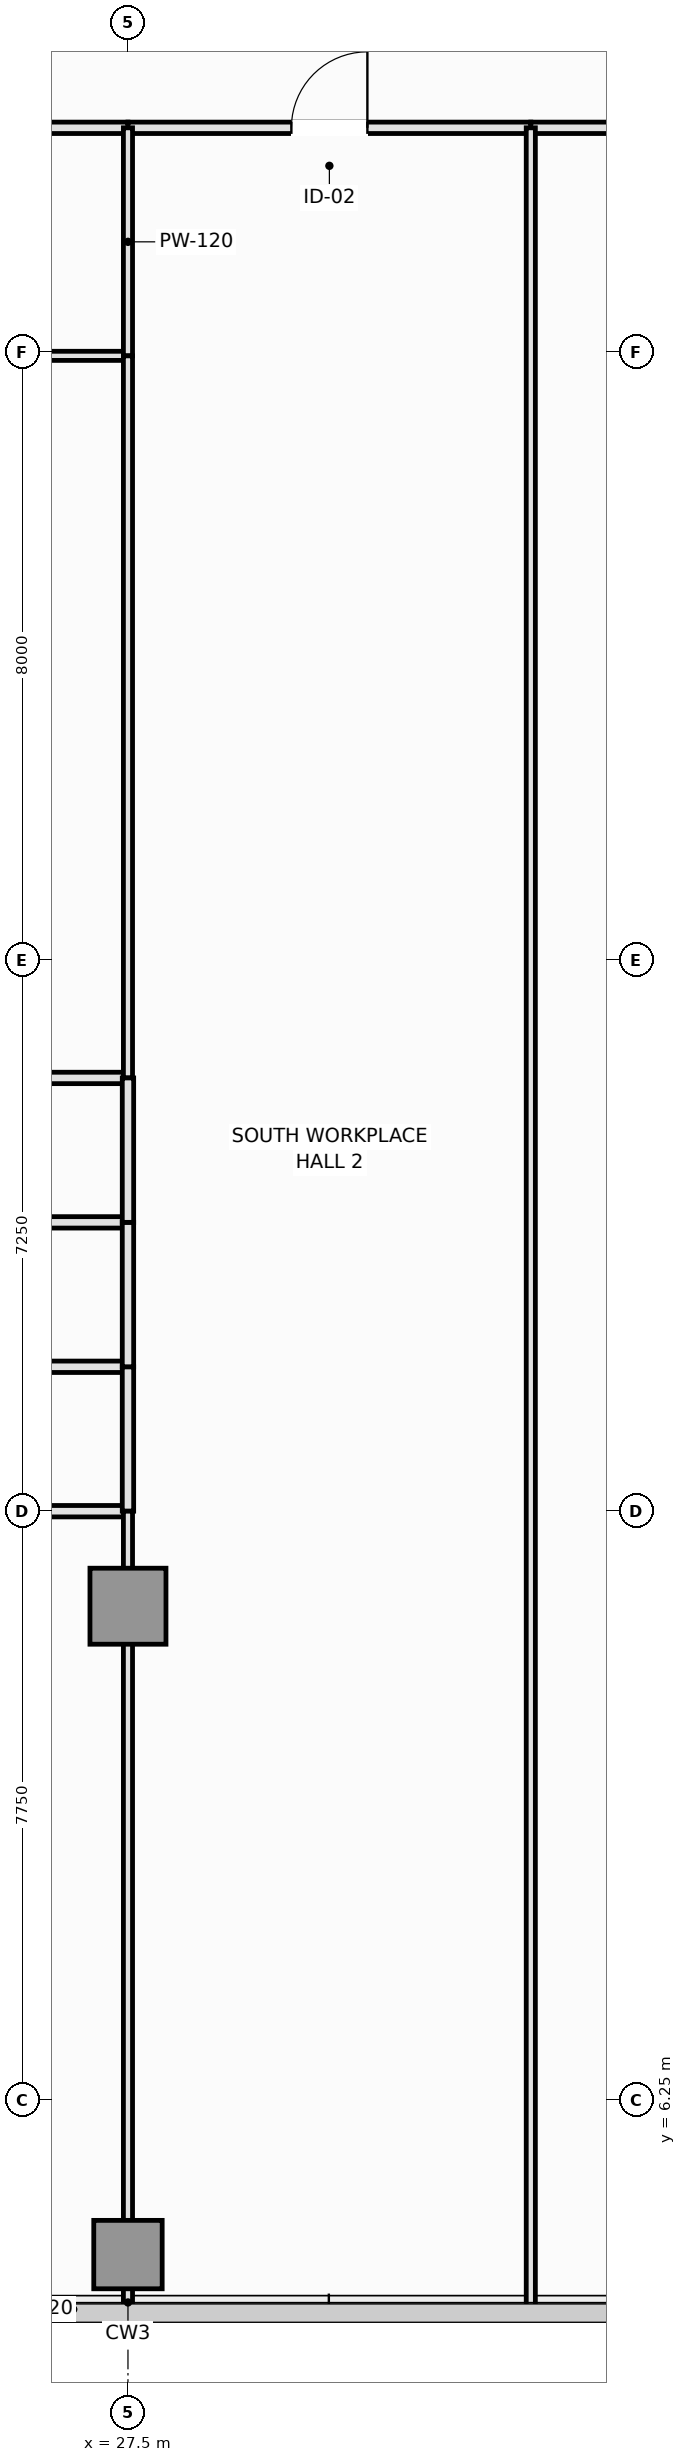
"""IFC4 building model, lengths in metres.
Left out: names, types, materials, properties, quantities, classifications, styles, units other than length and angle.
Written with IfcOpenShell. Run it as: python <this file> out.ifc"""

import sys

from ifc_helpers import new_model, si_unit, direction, frame, frame_2d, origin, origin_2d, place, context, subcontext, project, spatial, rectangle, extrude, element, fill, save


model = new_model("IFC4")
c1 = context("Model", 3, precision=1e-05, world=origin(), true_north=direction((0.0, 1.0)))
c2 = subcontext(c1, "Body", "Model", "MODEL_VIEW")
j1 = project(units=[si_unit("LENGTHUNIT", "METRE"), si_unit("PLANEANGLEUNIT", "RADIAN")], contexts=[c1])
p1 = place(None, origin())
s1 = spatial("IfcSite", under=j1, at=p1, CompositionType="ELEMENT")
p2 = place(p1, origin())
s2 = spatial("IfcBuilding", under=s1, at=p2, CompositionType="ELEMENT")
p3 = place(p2, frame((0.0, 0.0, 116.45)))
s3 = spatial("IfcBuildingStorey", under=s2, at=p3, CompositionType="ELEMENT", Elevation=116.45)
p4 = place(p3, frame((27.5, 12.75, 0.0), z_axis=(0.0, 0.0, 1.0), x_axis=(1.0, 0.0, 0.0)))
e1 = element("IfcColumn", 1, at=p4, inside=s3, PredefinedType="COLUMN", context=c2, shape_type="SweptSolid", body=[
    extrude(rectangle(XDim=1.0, YDim=1.0, at=origin_2d()), origin(), (0.0, 0.0, 1.0), 3.55),
])
p5 = place(p3, frame((27.5, 4.22, 0.0), z_axis=(0.0, 0.0, 1.0), x_axis=(1.0, 0.0, 0.0)))
e2 = element("IfcColumn", 2, at=p5, inside=s3, PredefinedType="COLUMN", context=c2, shape_type="SweptSolid", body=[
    extrude(rectangle(XDim=0.9, YDim=0.9, at=origin_2d()), origin(), (0.0, 0.0, 1.0), 3.55),
])
p6 = place(p3, frame((23.2, 32.2, 0.0), z_axis=(0.0, 0.0, 1.0), x_axis=(1.0, 0.0, 0.0)))
e3 = element("IfcWall", 3, at=p6, inside=s3, PredefinedType="PARTITIONING", context=c2, shape_type="SweptSolid", body=[
    extrude(rectangle(XDim=4.3, YDim=0.15, at=frame_2d((2.15, 0.0))), origin(), (0.0, 0.0, 1.0), 3.37),
])
p7 = place(p6, frame((1.65, 0.0, 0.0)))
e4 = element("IfcOpeningElement", 4, at=p7, cuts=e3, PredefinedType="OPENING", context=c2, shape_type="SweptSolid", body=[
    extrude(rectangle(XDim=1.0, YDim=2.15, at=frame_2d((0.5, 1.075))), frame((0.0, 0.085, 0.0), z_axis=(0.0, -1.0, 0.0), x_axis=(1.0, 0.0, 0.0)), (0.0, 0.0, 1.0), 0.17),
])
p8 = place(p3, frame((27.5, 32.2, 0.0), z_axis=(0.0, 0.0, 1.0), x_axis=(1.0, 0.0, 0.0)))
e5 = element("IfcWall", 5, at=p8, inside=s3, PredefinedType="PARTITIONING", context=c2, shape_type="SweptSolid", body=[
    extrude(rectangle(XDim=5.3, YDim=0.15, at=frame_2d((2.65, 0.0))), origin(), (0.0, 0.0, 1.0), 3.37),
])
p9 = place(p8, frame((2.15, 0.0, 0.0)))
e6 = element("IfcOpeningElement", 6, at=p9, cuts=e5, PredefinedType="OPENING", context=c2, shape_type="SweptSolid", body=[
    extrude(rectangle(XDim=1.0, YDim=2.15, at=frame_2d((0.5, 1.075))), frame((0.0, 0.085, 0.0), z_axis=(0.0, -1.0, 0.0), x_axis=(1.0, 0.0, 0.0)), (0.0, 0.0, 1.0), 0.17),
])
p10 = place(p3, frame((32.8, 32.2, 0.0), z_axis=(0.0, 0.0, 1.0), x_axis=(1.0, 0.0, 0.0)))
e7 = element("IfcWall", 7, at=p10, inside=s3, PredefinedType="PARTITIONING", context=c2, shape_type="SweptSolid", body=[
    extrude(rectangle(XDim=5.4, YDim=0.15, at=frame_2d((2.7, 0.0))), origin(), (0.0, 0.0, 1.0), 3.37),
])
p11 = place(p10, frame((2.2, 0.0, 0.0)))
e8 = element("IfcOpeningElement", 8, at=p11, cuts=e7, PredefinedType="OPENING", context=c2, shape_type="SweptSolid", body=[
    extrude(rectangle(XDim=1.0, YDim=2.15, at=frame_2d((0.5, 1.075))), frame((0.0, 0.085, 0.0), z_axis=(0.0, -1.0, 0.0), x_axis=(1.0, 0.0, 0.0)), (0.0, 0.0, 1.0), 0.17),
])
p12 = place(p3, frame((23.2, 29.2, 0.0), z_axis=(0.0, 0.0, 1.0), x_axis=(1.0, 0.0, 0.0)))
e9 = element("IfcWall", 9, at=p12, inside=s3, PredefinedType="PARTITIONING", context=c2, shape_type="SweptSolid", body=[
    extrude(rectangle(XDim=4.3, YDim=0.12, at=frame_2d((2.15, 0.0))), origin(), (0.0, 0.0, 1.0), 3.37),
])
p13 = place(p3, frame((27.5, 29.2, 0.0), z_axis=(0.0, 0.0, 1.0), x_axis=(0.0, 1.0, 0.0)))
e10 = element("IfcWall", 10, at=p13, inside=s3, PredefinedType="PARTITIONING", context=c2, shape_type="SweptSolid", body=[
    extrude(rectangle(XDim=3.0, YDim=0.12, at=frame_2d((1.5, 0.0))), origin(), (0.0, 0.0, 1.0), 3.37),
])
p14 = place(p3, frame((19.95, 19.7, 0.0), z_axis=(0.0, 0.0, 1.0), x_axis=(1.0, 0.0, 0.0)))
e11 = element("IfcWall", 11, at=p14, inside=s3, PredefinedType="PLUMBINGWALL", context=c2, shape_type="SweptSolid", body=[
    extrude(rectangle(XDim=7.55, YDim=0.15, at=frame_2d((3.775, 0.0))), origin(), (0.0, 0.0, 1.0), 3.37),
])
p15 = place(p3, frame((27.5, 19.7, 0.0), z_axis=(0.0, 0.0, 1.0), x_axis=(0.0, 1.0, 0.0)))
e12 = element("IfcWall", 12, at=p15, inside=s3, PredefinedType="PARTITIONING", context=c2, shape_type="SweptSolid", body=[
    extrude(rectangle(XDim=9.5, YDim=0.12, at=frame_2d((4.75, 0.0))), origin(), (0.0, 0.0, 1.0), 3.37),
])
for number, where, z_axis, x_axis in (
    (13, (19.95, 15.9, 0.0), (0.0, 0.0, 1.0), (1.0, 0.0, 0.0)),
    (14, (19.95, 14.0, 0.0), (0.0, 0.0, 1.0), (1.0, 0.0, 0.0)),
):
    element("IfcWall", number, at=place(p3, frame(where, z_axis=z_axis, x_axis=x_axis)), inside=s3, PredefinedType="PLUMBINGWALL", context=c2, shape_type="SweptSolid", body=[
        extrude(rectangle(XDim=7.55, YDim=0.15, at=frame_2d((3.775, 0.0))), origin(), (0.0, 0.0, 1.0), 3.37),
    ])
p16 = place(p3, frame((27.5, 14.0, 0.0), z_axis=(0.0, 0.0, 1.0), x_axis=(0.0, 1.0, 0.0)))
e15 = element("IfcWall", 15, at=p16, inside=s3, PredefinedType="PLUMBINGWALL", context=c2, shape_type="SweptSolid", body=[
    extrude(rectangle(XDim=1.9, YDim=0.15, at=frame_2d((0.95, 0.0))), origin(), (0.0, 0.0, 1.0), 3.37),
])
p17 = place(p3, frame((19.95, 17.8, 0.0), z_axis=(0.0, 0.0, 1.0), x_axis=(1.0, 0.0, 0.0)))
e16 = element("IfcWall", 16, at=p17, inside=s3, PredefinedType="PLUMBINGWALL", context=c2, shape_type="SweptSolid", body=[
    extrude(rectangle(XDim=7.55, YDim=0.15, at=frame_2d((3.775, 0.0))), origin(), (0.0, 0.0, 1.0), 3.37),
])
p18 = place(p3, frame((27.5, 15.9, 0.0), z_axis=(0.0, 0.0, 1.0), x_axis=(0.0, 1.0, 0.0)))
e17 = element("IfcWall", 17, at=p18, inside=s3, PredefinedType="PLUMBINGWALL", context=c2, shape_type="SweptSolid", body=[
    extrude(rectangle(XDim=1.9, YDim=0.15, at=frame_2d((0.95, 0.0))), origin(), (0.0, 0.0, 1.0), 3.37),
])
p19 = place(p3, frame((27.5, 17.8, 0.0), z_axis=(0.0, 0.0, 1.0), x_axis=(0.0, 1.0, 0.0)))
e18 = element("IfcWall", 18, at=p19, inside=s3, PredefinedType="PLUMBINGWALL", context=c2, shape_type="SweptSolid", body=[
    extrude(rectangle(XDim=1.9, YDim=0.15, at=frame_2d((0.95, 0.0))), origin(), (0.0, 0.0, 1.0), 3.37),
])
p20 = place(p3, frame((27.5, 3.51, 0.0), z_axis=(0.0, 0.0, 1.0), x_axis=(0.0, 1.0, 0.0)))
e19 = element("IfcWall", 19, at=p20, inside=s3, PredefinedType="PARTITIONING", context=c2, shape_type="SweptSolid", body=[
    extrude(rectangle(XDim=10.49, YDim=0.12, at=frame_2d((5.245, 0.0))), origin(), (0.0, 0.0, 1.0), 2.87),
])
p21 = place(p3, frame((32.8, 3.51, 0.0), z_axis=(0.0, 0.0, 1.0), x_axis=(0.0, 1.0, 0.0)))
e20 = element("IfcWall", 20, at=p21, inside=s3, PredefinedType="PARTITIONING", context=c2, shape_type="SweptSolid", body=[
    extrude(rectangle(XDim=28.69, YDim=0.12, at=frame_2d((14.345, 0.0))), origin(), (0.0, 0.0, 1.0), 3.37),
])
p22 = place(p9, origin())
e21 = element("IfcDoor", 21, at=p22, inside=s3, OperationType="SINGLE_SWING_RIGHT", PredefinedType="DOOR", context=c2, shape_type="SweptSolid", body=[
    extrude(rectangle(XDim=1.0, YDim=2.15, at=frame_2d((0.5, 1.075))), frame((0.0, 0.025, 0.0), z_axis=(0.0, -1.0, 0.0), x_axis=(1.0, 0.0, 0.0)), (0.0, 0.0, 1.0), 0.05),
])
fill(e6, e21)
save(model, sys.argv[1])
